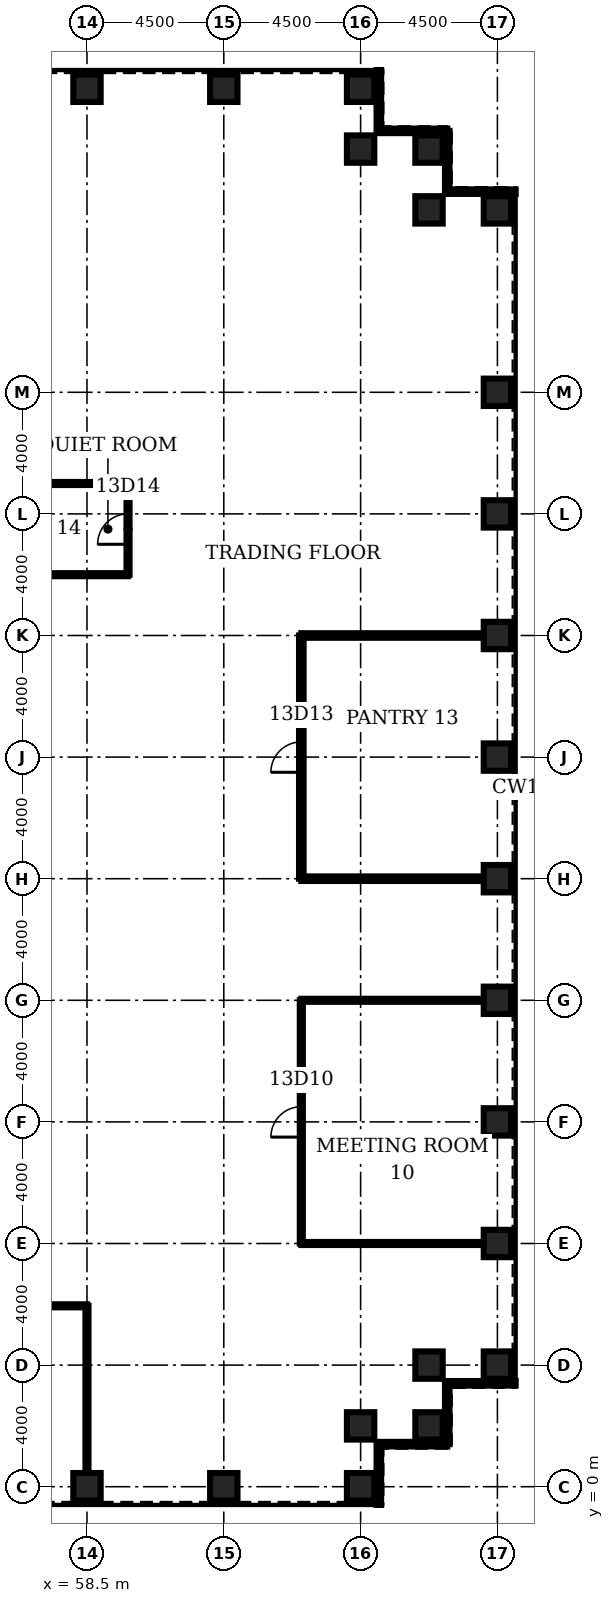
"""IFC4 building model, lengths in metres.
Left out: names, types, materials, properties, quantities, classifications, styles, units other than length and angle.
Written with IfcOpenShell. Run it as: python <this file> out.ifc"""

import sys

from ifc_helpers import new_model, si_unit, direction, frame, frame_2d, origin, origin_2d, place, context, subcontext, project, spatial, rectangle, hollow_rectangle, extrude, element, fill, save


model = new_model("IFC4")
c1 = context("Model", 3, precision=1e-05, world=origin(), true_north=direction((0.0, 1.0)))
c2 = subcontext(c1, "Body", "Model", "MODEL_VIEW")
j1 = project(units=[si_unit("LENGTHUNIT", "METRE"), si_unit("PLANEANGLEUNIT", "RADIAN")], contexts=[c1])
p1 = place(None, origin())
s1 = spatial("IfcSite", under=j1, at=p1, CompositionType="ELEMENT")
p2 = place(p1, origin())
s2 = spatial("IfcBuilding", under=s1, at=p2, CompositionType="ELEMENT")
p3 = place(p2, frame((0.0, 0.0, 63.5)))
s3 = spatial("IfcBuildingStorey", under=s2, at=p3, CompositionType="ELEMENT", Elevation=63.5)
for number, where, z_axis, x_axis in (
    (1, (58.5, 0.0, 0.0), (0.0, 0.0, 1.0), (0.0, 1.0, 0.0)),
    (2, (63.0, 0.0, 0.0), (0.0, 0.0, 1.0), (0.0, 1.0, 0.0)),
    (3, (67.5, 0.0, 0.0), (0.0, 0.0, 1.0), (0.0, 1.0, 0.0)),
    (4, (67.5, 2.0, 0.0), (0.0, 0.0, 1.0), (0.0, 1.0, 0.0)),
    (5, (69.75, 2.0, 0.0), (0.0, 0.0, 1.0), (1.0, 0.0, 0.0)),
    (6, (69.75, 4.0, 0.0), (0.0, 0.0, 1.0), (1.0, 0.0, 0.0)),
    (7, (72.0, 4.0, 0.0), (0.0, 0.0, 1.0), (1.0, 0.0, 0.0)),
    (8, (72.0, 8.0, 0.0), (0.0, 0.0, 1.0), (1.0, 0.0, 0.0)),
    (9, (72.0, 12.0, 0.0), (0.0, 0.0, 1.0), (1.0, 0.0, 0.0)),
    (10, (72.0, 16.0, 0.0), (0.0, 0.0, 1.0), (1.0, 0.0, 0.0)),
    (11, (72.0, 20.0, 0.0), (0.0, 0.0, 1.0), (1.0, 0.0, 0.0)),
    (12, (72.0, 24.0, 0.0), (0.0, 0.0, 1.0), (1.0, 0.0, 0.0)),
    (13, (72.0, 28.0, 0.0), (0.0, 0.0, 1.0), (1.0, 0.0, 0.0)),
    (14, (72.0, 32.0, 0.0), (0.0, 0.0, 1.0), (1.0, 0.0, 0.0)),
    (15, (72.0, 36.0, 0.0), (0.0, 0.0, 1.0), (1.0, 0.0, 0.0)),
    (16, (72.0, 42.0, 0.0), (0.0, 0.0, 1.0), (1.0, 0.0, 0.0)),
    (17, (69.75, 42.0, 0.0), (0.0, 0.0, 1.0), (1.0, 0.0, 0.0)),
    (18, (69.75, 44.0, 0.0), (0.0, 0.0, 1.0), (1.0, 0.0, 0.0)),
    (19, (67.5, 44.0, 0.0), (0.0, 0.0, 1.0), (0.0, 1.0, 0.0)),
    (20, (67.5, 46.0, 0.0), (0.0, 0.0, 1.0), (0.0, 1.0, 0.0)),
    (21, (63.0, 46.0, 0.0), (0.0, 0.0, 1.0), (0.0, 1.0, 0.0)),
    (22, (58.5, 46.0, 0.0), (0.0, 0.0, 1.0), (0.0, 1.0, 0.0)),
):
    element("IfcColumn", number, at=place(p3, frame(where, z_axis=z_axis, x_axis=x_axis)), inside=s3, PredefinedType="COLUMN", context=c2, shape_type="SweptSolid", body=[
        extrude(hollow_rectangle(XDim=0.9, YDim=0.9, WallThickness=0.12, at=origin_2d()), origin(), (0.0, 0.0, 1.0), 4.5),
    ])
p4 = place(p3, frame((49.5, 5.95, 0.0), z_axis=(0.0, 0.0, 1.0), x_axis=(1.0, 0.0, 0.0)))
e23 = element("IfcWall", 23, at=p4, inside=s3, PredefinedType="PARTITIONING", context=c2, shape_type="SweptSolid", body=[
    extrude(rectangle(XDim=9.0, YDim=0.1, at=frame_2d((4.5, 0.0))), origin(), (0.0, 0.0, 1.0), 3.0),
])
p5 = place(p4, frame((4.0, 0.0, 0.0)))
e24 = element("IfcOpeningElement", 24, at=p5, cuts=e23, PredefinedType="OPENING", context=c2, shape_type="SweptSolid", body=[
    extrude(rectangle(XDim=1.0, YDim=2.1, at=frame_2d((0.5, 1.05))), frame((0.0, 0.06, 0.0), z_axis=(0.0, -1.0, 0.0), x_axis=(1.0, 0.0, 0.0)), (0.0, 0.0, 1.0), 0.12),
])
for number, where, z_axis, x_axis in (
    (25, (65.55, 8.0, 0.0), (0.0, 0.0, 1.0), (1.0, 0.0, 0.0)),
    (26, (65.55, 16.0, 0.0), (0.0, 0.0, 1.0), (1.0, 0.0, 0.0)),
):
    element("IfcWall", number, at=place(p3, frame(where, z_axis=z_axis, x_axis=x_axis)), inside=s3, PredefinedType="PARTITIONING", context=c2, shape_type="SweptSolid", body=[
        extrude(rectangle(XDim=6.0, YDim=0.1, at=frame_2d((3.0, 0.0))), origin(), (0.0, 0.0, 1.0), 3.0),
    ])
for number, where, z_axis, x_axis in (
    (27, (65.55, 20.0, 0.0), (0.0, 0.0, 1.0), (1.0, 0.0, 0.0)),
    (28, (65.55, 28.0, 0.0), (0.0, 0.0, 1.0), (1.0, 0.0, 0.0)),
):
    element("IfcWall", number, at=place(p3, frame(where, z_axis=z_axis, x_axis=x_axis)), inside=s3, PredefinedType="PARTITIONING", context=c2, shape_type="SweptSolid", body=[
        extrude(rectangle(XDim=6.0, YDim=0.15, at=frame_2d((3.0, 0.0))), origin(), (0.0, 0.0, 1.0), 3.0),
    ])
for number, where, z_axis, x_axis in (
    (29, (56.85, 30.0, 0.0), (0.0, 0.0, 1.0), (1.0, 0.0, 0.0)),
    (30, (56.85, 33.0, 0.0), (0.0, 0.0, 1.0), (1.0, 0.0, 0.0)),
):
    element("IfcWall", number, at=place(p3, frame(where, z_axis=z_axis, x_axis=x_axis)), inside=s3, PredefinedType="PARTITIONING", context=c2, shape_type="SweptSolid", body=[
        extrude(rectangle(XDim=3.0, YDim=0.1, at=frame_2d((1.5, 0.0))), origin(), (0.0, 0.0, 1.0), 3.0),
    ])
p6 = place(p3, frame((58.5, 0.45, 0.0), z_axis=(0.0, 0.0, 1.0), x_axis=(0.0, 1.0, 0.0)))
e31 = element("IfcWall", 31, at=p6, inside=s3, PredefinedType="PARTITIONING", context=c2, shape_type="SweptSolid", body=[
    extrude(rectangle(XDim=5.5, YDim=0.1, at=frame_2d((2.75, 0.0))), origin(), (0.0, 0.0, 1.0), 3.0),
])
p7 = place(p3, frame((59.85, 30.0, 0.0), z_axis=(0.0, 0.0, 1.0), x_axis=(0.0, 1.0, 0.0)))
e32 = element("IfcWall", 32, at=p7, inside=s3, PredefinedType="PARTITIONING", context=c2, shape_type="SweptSolid", body=[
    extrude(rectangle(XDim=3.0, YDim=0.1, at=frame_2d((1.5, 0.0))), origin(), (0.0, 0.0, 1.0), 3.0),
])
p8 = place(p7, frame((1.0, 0.0, 0.0)))
e33 = element("IfcOpeningElement", 33, at=p8, cuts=e32, PredefinedType="OPENING", context=c2, shape_type="SweptSolid", body=[
    extrude(rectangle(XDim=1.0, YDim=2.1, at=frame_2d((0.5, 1.05))), frame((0.0, 0.06, 0.0), z_axis=(0.0, -1.0, 0.0), x_axis=(1.0, 0.0, 0.0)), (0.0, 0.0, 1.0), 0.12),
])
p9 = place(p3, frame((65.55, 8.0, 0.0), z_axis=(0.0, 0.0, 1.0), x_axis=(0.0, 1.0, 0.0)))
e34 = element("IfcWall", 34, at=p9, inside=s3, PredefinedType="PARTITIONING", context=c2, shape_type="SweptSolid", body=[
    extrude(rectangle(XDim=8.0, YDim=0.1, at=frame_2d((4.0, 0.0))), origin(), (0.0, 0.0, 1.0), 3.0),
])
p10 = place(p9, frame((3.5, 0.0, 0.0)))
e35 = element("IfcOpeningElement", 35, at=p10, cuts=e34, PredefinedType="OPENING", context=c2, shape_type="SweptSolid", body=[
    extrude(rectangle(XDim=1.0, YDim=2.1, at=frame_2d((0.5, 1.05))), frame((0.0, 0.06, 0.0), z_axis=(0.0, -1.0, 0.0), x_axis=(1.0, 0.0, 0.0)), (0.0, 0.0, 1.0), 0.12),
])
p11 = place(p3, frame((65.55, 20.0, 0.0), z_axis=(0.0, 0.0, 1.0), x_axis=(0.0, 1.0, 0.0)))
e36 = element("IfcWall", 36, at=p11, inside=s3, PredefinedType="PARTITIONING", context=c2, shape_type="SweptSolid", body=[
    extrude(rectangle(XDim=8.0, YDim=0.15, at=frame_2d((4.0, 0.0))), origin(), (0.0, 0.0, 1.0), 3.0),
])
p12 = place(p11, frame((3.5, 0.0, 0.0)))
e37 = element("IfcOpeningElement", 37, at=p12, cuts=e36, PredefinedType="OPENING", context=c2, shape_type="SweptSolid", body=[
    extrude(rectangle(XDim=1.0, YDim=2.1, at=frame_2d((0.5, 1.05))), frame((0.0, 0.085, 0.0), z_axis=(0.0, -1.0, 0.0), x_axis=(1.0, 0.0, 0.0)), (0.0, 0.0, 1.0), 0.17),
])
p13 = place(p3, frame((68.1, -0.6, 0.0), z_axis=(0.0, 0.0, 1.0), x_axis=(0.0, 1.0, 0.0)))
e38 = element("IfcWall", 38, at=p13, inside=s3, PredefinedType="ELEMENTEDWALL", context=c2, shape_type="SweptSolid", body=[
    extrude(rectangle(XDim=2.0, YDim=0.15, at=frame_2d((1.0, 0.0))), origin(), (0.0, 0.0, 1.0), 4.32),
])
p14 = place(p3, frame((68.1, 1.4, 0.0), z_axis=(0.0, 0.0, 1.0), x_axis=(1.0, 0.0, 0.0)))
e39 = element("IfcWall", 39, at=p14, inside=s3, PredefinedType="ELEMENTEDWALL", context=c2, shape_type="SweptSolid", body=[
    extrude(rectangle(XDim=2.25, YDim=0.15, at=frame_2d((1.125, 0.0))), origin(), (0.0, 0.0, 1.0), 4.32),
])
p15 = place(p3, frame((70.35, 1.4, 0.0), z_axis=(0.0, 0.0, 1.0), x_axis=(0.0, 1.0, 0.0)))
e40 = element("IfcWall", 40, at=p15, inside=s3, PredefinedType="ELEMENTEDWALL", context=c2, shape_type="SweptSolid", body=[
    extrude(rectangle(XDim=2.0, YDim=0.15, at=frame_2d((1.0, 0.0))), origin(), (0.0, 0.0, 1.0), 4.32),
])
for number, where, z_axis, x_axis in (
    (41, (70.35, 3.4, 0.0), (0.0, 0.0, 1.0), (1.0, 0.0, 0.0)),
    (42, (72.6, 42.6, 0.0), (0.0, 0.0, 1.0), (-1.0, 0.0, 0.0)),
):
    element("IfcWall", number, at=place(p3, frame(where, z_axis=z_axis, x_axis=x_axis)), inside=s3, PredefinedType="ELEMENTEDWALL", context=c2, shape_type="SweptSolid", body=[
        extrude(rectangle(XDim=2.25, YDim=0.15, at=frame_2d((1.125, 0.0))), origin(), (0.0, 0.0, 1.0), 4.32),
    ])
p16 = place(p3, frame((70.35, 42.6, 0.0), z_axis=(0.0, 0.0, 1.0), x_axis=(0.0, 1.0, 0.0)))
e43 = element("IfcWall", 43, at=p16, inside=s3, PredefinedType="ELEMENTEDWALL", context=c2, shape_type="SweptSolid", body=[
    extrude(rectangle(XDim=2.0, YDim=0.15, at=frame_2d((1.0, 0.0))), origin(), (0.0, 0.0, 1.0), 4.32),
])
p17 = place(p3, frame((70.35, 44.6, 0.0), z_axis=(0.0, 0.0, 1.0), x_axis=(-1.0, 0.0, 0.0)))
e44 = element("IfcWall", 44, at=p17, inside=s3, PredefinedType="ELEMENTEDWALL", context=c2, shape_type="SweptSolid", body=[
    extrude(rectangle(XDim=2.25, YDim=0.15, at=frame_2d((1.125, 0.0))), origin(), (0.0, 0.0, 1.0), 4.32),
])
p18 = place(p3, frame((68.1, 44.6, 0.0), z_axis=(0.0, 0.0, 1.0), x_axis=(0.0, 1.0, 0.0)))
e45 = element("IfcWall", 45, at=p18, inside=s3, PredefinedType="ELEMENTEDWALL", context=c2, shape_type="SweptSolid", body=[
    extrude(rectangle(XDim=2.0, YDim=0.15, at=frame_2d((1.0, 0.0))), origin(), (0.0, 0.0, 1.0), 4.32),
])
p19 = place(p10, origin())
e46 = element("IfcDoor", 46, at=p19, inside=s3, OperationType="SINGLE_SWING_LEFT", PredefinedType="DOOR", context=c2, shape_type="SweptSolid", body=[
    extrude(rectangle(XDim=1.0, YDim=2.1, at=frame_2d((0.5, 1.05))), frame((0.0, 0.025, 0.0), z_axis=(0.0, -1.0, 0.0), x_axis=(1.0, 0.0, 0.0)), (0.0, 0.0, 1.0), 0.05),
])
fill(e35, e46)
p20 = place(p12, origin())
e47 = element("IfcDoor", 47, at=p20, inside=s3, OperationType="SINGLE_SWING_LEFT", PredefinedType="DOOR", context=c2, shape_type="SweptSolid", body=[
    extrude(rectangle(XDim=1.0, YDim=2.1, at=frame_2d((0.5, 1.05))), frame((0.0, 0.025, 0.0), z_axis=(0.0, -1.0, 0.0), x_axis=(1.0, 0.0, 0.0)), (0.0, 0.0, 1.0), 0.05),
])
fill(e37, e47)
p21 = place(p8, origin())
e48 = element("IfcDoor", 48, at=p21, inside=s3, OperationType="SINGLE_SWING_LEFT", PredefinedType="DOOR", context=c2, shape_type="SweptSolid", body=[
    extrude(rectangle(XDim=1.0, YDim=2.1, at=frame_2d((0.5, 1.05))), frame((0.0, 0.025, 0.0), z_axis=(0.0, -1.0, 0.0), x_axis=(1.0, 0.0, 0.0)), (0.0, 0.0, 1.0), 0.05),
])
fill(e33, e48)
save(model, sys.argv[1])
